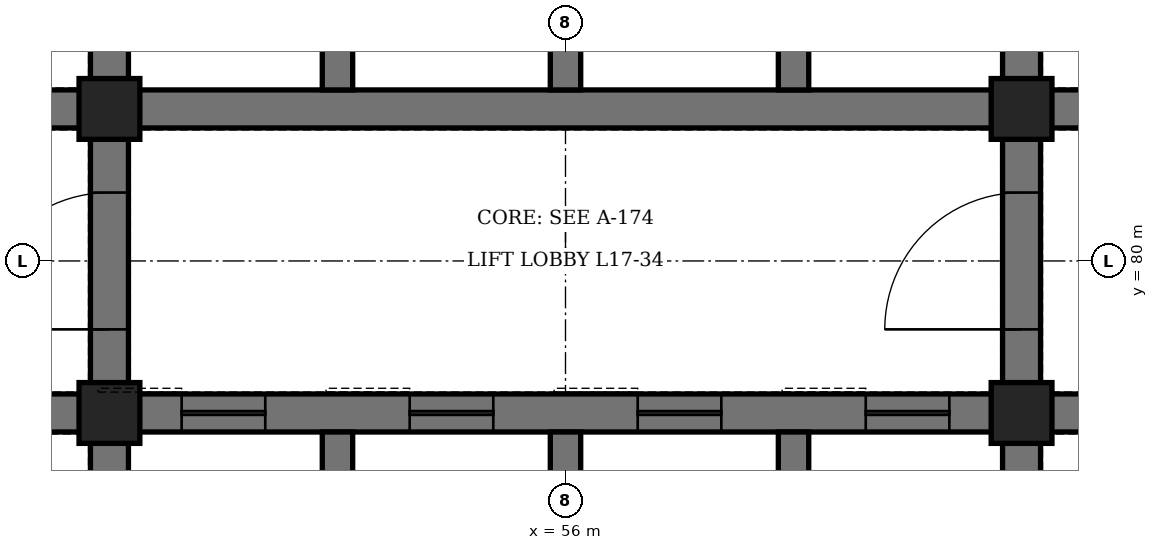
"""IFC4 building model, lengths in metres.
Left out: names, types, materials, properties, quantities, classifications, styles, units other than length and angle.
Written with IfcOpenShell. Run it as: python <this file> out.ifc"""

import sys

from ifc_helpers import new_model, si_unit, direction, frame, frame_2d, origin, origin_2d, place, context, subcontext, project, spatial, rectangle, hollow_rectangle, extrude, element, fill, save


model = new_model("IFC4")
c1 = context("Model", 3, precision=1e-05, world=origin(), true_north=direction((0.0, 1.0)))
c2 = subcontext(c1, "Body", "Model", "MODEL_VIEW")
j1 = project(units=[si_unit("LENGTHUNIT", "METRE"), si_unit("PLANEANGLEUNIT", "RADIAN")], contexts=[c1])
p1 = place(None, origin())
s1 = spatial("IfcSite", under=j1, at=p1, CompositionType="ELEMENT")
p2 = place(p1, origin())
s2 = spatial("IfcBuilding", under=s1, at=p2, CompositionType="ELEMENT")
p3 = place(p2, frame((0.0, 0.0, 81.1)))
s3 = spatial("IfcBuildingStorey", under=s2, at=p3, CompositionType="ELEMENT", Elevation=81.1)
p4 = place(p3, frame((50.0, 71.6, 0.0), z_axis=(0.0, 0.0, 1.0), x_axis=(0.0, 1.0, 0.0)))
e1 = element("IfcWall", 1, at=p4, inside=s3, PredefinedType="SHEAR", context=c2, shape_type="SweptSolid", body=[
    extrude(rectangle(XDim=16.8, YDim=0.5, at=frame_2d((8.4, 0.0))), origin(), (0.0, 0.0, 1.0), 4.2),
])
p5 = place(p4, frame((7.5, 0.0, 0.0)))
e2 = element("IfcOpeningElement", 2, at=p5, cuts=e1, PredefinedType="OPENING", context=c2, shape_type="SweptSolid", body=[
    extrude(rectangle(XDim=1.8, YDim=2.4, at=frame_2d((0.9, 1.2))), frame((0.0, 0.26, 0.0), z_axis=(0.0, -1.0, 0.0), x_axis=(1.0, 0.0, 0.0)), (0.0, 0.0, 1.0), 0.52),
])
p6 = place(p3, frame((62.0, 71.6, 0.0), z_axis=(0.0, 0.0, 1.0), x_axis=(0.0, 1.0, 0.0)))
e3 = element("IfcWall", 3, at=p6, inside=s3, PredefinedType="SHEAR", context=c2, shape_type="SweptSolid", body=[
    extrude(rectangle(XDim=16.8, YDim=0.5, at=frame_2d((8.4, 0.0))), origin(), (0.0, 0.0, 1.0), 4.2),
])
p7 = place(p6, frame((7.5, 0.0, 0.0)))
e4 = element("IfcOpeningElement", 4, at=p7, cuts=e3, PredefinedType="OPENING", context=c2, shape_type="SweptSolid", body=[
    extrude(rectangle(XDim=1.8, YDim=2.4, at=frame_2d((0.9, 1.2))), frame((0.0, 0.26, 0.0), z_axis=(0.0, -1.0, 0.0), x_axis=(1.0, 0.0, 0.0)), (0.0, 0.0, 1.0), 0.52),
])
p8 = place(p3, frame((44.6, 78.0, 0.0), z_axis=(0.0, 0.0, 1.0), x_axis=(1.0, 0.0, 0.0)))
e5 = element("IfcWall", 5, at=p8, inside=s3, PredefinedType="SHEAR", context=c2, shape_type="SweptSolid", body=[
    extrude(rectangle(XDim=5.15, YDim=0.5, at=frame_2d((2.575, 0.0))), origin(), (0.0, 0.0, 1.0), 4.2),
])
p9 = place(p8, frame((1.8, 0.0, 0.0)))
e6 = element("IfcOpeningElement", 6, at=p9, cuts=e5, PredefinedType="OPENING", context=c2, shape_type="SweptSolid", body=[
    extrude(rectangle(XDim=1.2, YDim=2.1, at=frame_2d((0.6, 1.05))), frame((0.0, 0.26, 0.0), z_axis=(0.0, -1.0, 0.0), x_axis=(1.0, 0.0, 0.0)), (0.0, 0.0, 1.0), 0.52),
])
p10 = place(p3, frame((44.6, 82.0, 0.0), z_axis=(0.0, 0.0, 1.0), x_axis=(1.0, 0.0, 0.0)))
e7 = element("IfcWall", 7, at=p10, inside=s3, PredefinedType="SHEAR", context=c2, shape_type="SweptSolid", body=[
    extrude(rectangle(XDim=5.15, YDim=0.5, at=frame_2d((2.575, 0.0))), origin(), (0.0, 0.0, 1.0), 4.2),
])
p11 = place(p10, frame((0.7, 0.0, 0.0)))
e8 = element("IfcOpeningElement", 8, at=p11, cuts=e7, PredefinedType="OPENING", context=c2, shape_type="SweptSolid", body=[
    extrude(rectangle(XDim=0.9, YDim=2.1, at=frame_2d((0.45, 1.05))), frame((0.0, 0.26, 0.0), z_axis=(0.0, -1.0, 0.0), x_axis=(1.0, 0.0, 0.0)), (0.0, 0.0, 1.0), 0.52),
])
p12 = place(p3, frame((62.25, 78.0, 0.0), z_axis=(0.0, 0.0, 1.0), x_axis=(1.0, 0.0, 0.0)))
e9 = element("IfcWall", 9, at=p12, inside=s3, PredefinedType="SHEAR", context=c2, shape_type="SweptSolid", body=[
    extrude(rectangle(XDim=5.15, YDim=0.5, at=frame_2d((2.575, 0.0))), origin(), (0.0, 0.0, 1.0), 4.2),
])
p13 = place(p12, frame((2.15, 0.0, 0.0)))
e10 = element("IfcOpeningElement", 10, at=p13, cuts=e9, PredefinedType="OPENING", context=c2, shape_type="SweptSolid", body=[
    extrude(rectangle(XDim=1.2, YDim=2.1, at=frame_2d((0.6, 1.05))), frame((0.0, 0.26, 0.0), z_axis=(0.0, -1.0, 0.0), x_axis=(1.0, 0.0, 0.0)), (0.0, 0.0, 1.0), 0.52),
])
p14 = place(p3, frame((62.25, 82.0, 0.0), z_axis=(0.0, 0.0, 1.0), x_axis=(1.0, 0.0, 0.0)))
e11 = element("IfcWall", 11, at=p14, inside=s3, PredefinedType="SHEAR", context=c2, shape_type="SweptSolid", body=[
    extrude(rectangle(XDim=5.15, YDim=0.5, at=frame_2d((2.575, 0.0))), origin(), (0.0, 0.0, 1.0), 4.2),
])
p15 = place(p14, frame((2.15, 0.0, 0.0)))
e12 = element("IfcOpeningElement", 12, at=p15, cuts=e11, PredefinedType="OPENING", context=c2, shape_type="SweptSolid", body=[
    extrude(rectangle(XDim=1.2, YDim=2.1, at=frame_2d((0.6, 1.05))), frame((0.0, 0.26, 0.0), z_axis=(0.0, -1.0, 0.0), x_axis=(1.0, 0.0, 0.0)), (0.0, 0.0, 1.0), 0.52),
])
p16 = place(p3, frame((50.25, 78.0, 0.0), z_axis=(0.0, 0.0, 1.0), x_axis=(1.0, 0.0, 0.0)))
e13 = element("IfcWall", 13, at=p16, inside=s3, PredefinedType="SHEAR", context=c2, shape_type="SweptSolid", body=[
    extrude(rectangle(XDim=11.5, YDim=0.5, at=frame_2d((5.75, 0.0))), origin(), (0.0, 0.0, 1.0), 4.2),
])
p17 = place(p16, frame((0.7, 0.0, 0.0)))
e14 = element("IfcOpeningElement", 14, at=p17, cuts=e13, PredefinedType="OPENING", context=c2, shape_type="SweptSolid", body=[
    extrude(rectangle(XDim=1.1, YDim=2.2, at=frame_2d((0.55, 1.1))), frame((0.0, 0.26, 0.0), z_axis=(0.0, -1.0, 0.0), x_axis=(1.0, 0.0, 0.0)), (0.0, 0.0, 1.0), 0.52),
])
p18 = place(p16, frame((3.7, 0.0, 0.0)))
e15 = element("IfcOpeningElement", 15, at=p18, cuts=e13, PredefinedType="OPENING", context=c2, shape_type="SweptSolid", body=[
    extrude(rectangle(XDim=1.1, YDim=2.2, at=frame_2d((0.55, 1.1))), frame((0.0, 0.26, 0.0), z_axis=(0.0, -1.0, 0.0), x_axis=(1.0, 0.0, 0.0)), (0.0, 0.0, 1.0), 0.52),
])
p19 = place(p16, frame((6.7, 0.0, 0.0)))
e16 = element("IfcOpeningElement", 16, at=p19, cuts=e13, PredefinedType="OPENING", context=c2, shape_type="SweptSolid", body=[
    extrude(rectangle(XDim=1.1, YDim=2.2, at=frame_2d((0.55, 1.1))), frame((0.0, 0.26, 0.0), z_axis=(0.0, -1.0, 0.0), x_axis=(1.0, 0.0, 0.0)), (0.0, 0.0, 1.0), 0.52),
])
p20 = place(p16, frame((9.7, 0.0, 0.0)))
e17 = element("IfcOpeningElement", 17, at=p20, cuts=e13, PredefinedType="OPENING", context=c2, shape_type="SweptSolid", body=[
    extrude(rectangle(XDim=1.1, YDim=2.2, at=frame_2d((0.55, 1.1))), frame((0.0, 0.26, 0.0), z_axis=(0.0, -1.0, 0.0), x_axis=(1.0, 0.0, 0.0)), (0.0, 0.0, 1.0), 0.52),
])
p21 = place(p3, frame((50.25, 82.0, 0.0), z_axis=(0.0, 0.0, 1.0), x_axis=(1.0, 0.0, 0.0)))
e18 = element("IfcWall", 18, at=p21, inside=s3, PredefinedType="SHEAR", context=c2, shape_type="SweptSolid", body=[
    extrude(rectangle(XDim=11.5, YDim=0.5, at=frame_2d((5.75, 0.0))), origin(), (0.0, 0.0, 1.0), 4.2),
])
p22 = place(p3, frame((53.0, 74.2, 0.0), z_axis=(0.0, 0.0, 1.0), x_axis=(0.0, 1.0, 0.0)))
e19 = element("IfcWall", 19, at=p22, inside=s3, PredefinedType="SHEAR", context=c2, shape_type="SweptSolid", body=[
    extrude(rectangle(XDim=3.55, YDim=0.4, at=frame_2d((1.775, 0.0))), origin(), (0.0, 0.0, 1.0), 4.2),
])
p23 = place(p3, frame((53.0, 82.25, 0.0), z_axis=(0.0, 0.0, 1.0), x_axis=(0.0, 1.0, 0.0)))
e20 = element("IfcWall", 20, at=p23, inside=s3, PredefinedType="SHEAR", context=c2, shape_type="SweptSolid", body=[
    extrude(rectangle(XDim=3.5, YDim=0.4, at=frame_2d((1.75, 0.0))), origin(), (0.0, 0.0, 1.0), 4.2),
])
p24 = place(p3, frame((56.0, 74.2, 0.0), z_axis=(0.0, 0.0, 1.0), x_axis=(0.0, 1.0, 0.0)))
e21 = element("IfcWall", 21, at=p24, inside=s3, PredefinedType="SHEAR", context=c2, shape_type="SweptSolid", body=[
    extrude(rectangle(XDim=3.55, YDim=0.4, at=frame_2d((1.775, 0.0))), origin(), (0.0, 0.0, 1.0), 4.2),
])
p25 = place(p3, frame((56.0, 82.25, 0.0), z_axis=(0.0, 0.0, 1.0), x_axis=(0.0, 1.0, 0.0)))
e22 = element("IfcWall", 22, at=p25, inside=s3, PredefinedType="SHEAR", context=c2, shape_type="SweptSolid", body=[
    extrude(rectangle(XDim=3.5, YDim=0.4, at=frame_2d((1.75, 0.0))), origin(), (0.0, 0.0, 1.0), 4.2),
])
p26 = place(p3, frame((59.0, 74.2, 0.0), z_axis=(0.0, 0.0, 1.0), x_axis=(0.0, 1.0, 0.0)))
e23 = element("IfcWall", 23, at=p26, inside=s3, PredefinedType="SHEAR", context=c2, shape_type="SweptSolid", body=[
    extrude(rectangle(XDim=3.55, YDim=0.4, at=frame_2d((1.775, 0.0))), origin(), (0.0, 0.0, 1.0), 4.2),
])
p27 = place(p3, frame((59.0, 82.25, 0.0), z_axis=(0.0, 0.0, 1.0), x_axis=(0.0, 1.0, 0.0)))
e24 = element("IfcWall", 24, at=p27, inside=s3, PredefinedType="SHEAR", context=c2, shape_type="SweptSolid", body=[
    extrude(rectangle(XDim=3.5, YDim=0.4, at=frame_2d((1.75, 0.0))), origin(), (0.0, 0.0, 1.0), 4.2),
])
for number, where, z_axis, x_axis in (
    (25, (50.0, 78.0, 0.0), (0.0, 0.0, 1.0), (1.0, 0.0, 0.0)),
    (26, (50.0, 82.0, 0.0), (0.0, 0.0, 1.0), (1.0, 0.0, 0.0)),
    (27, (62.0, 78.0, 0.0), (0.0, 0.0, 1.0), (1.0, 0.0, 0.0)),
    (28, (62.0, 82.0, 0.0), (0.0, 0.0, 1.0), (1.0, 0.0, 0.0)),
):
    element("IfcColumn", number, at=place(p3, frame(where, z_axis=z_axis, x_axis=x_axis)), inside=s3, PredefinedType="COLUMN", context=c2, shape_type="SweptSolid", body=[
        extrude(hollow_rectangle(XDim=0.8, YDim=0.8, WallThickness=0.1, at=origin_2d()), origin(), (0.0, 0.0, 1.0), 4.2),
    ])
p28 = place(p5, origin())
e29 = element("IfcDoor", 29, at=p28, inside=s3, OperationType="DOUBLE_DOOR_SINGLE_SWING", PredefinedType="DOOR", context=c2, shape_type="SweptSolid", body=[
    extrude(rectangle(XDim=1.8, YDim=2.4, at=frame_2d((0.9, 1.2))), frame((0.0, 0.25, 0.0), z_axis=(0.0, -1.0, 0.0), x_axis=(1.0, 0.0, 0.0)), (0.0, 0.0, 1.0), 0.5),
])
fill(e2, e29)
p29 = place(p7, origin())
e30 = element("IfcDoor", 30, at=p29, inside=s3, OperationType="DOUBLE_DOOR_SINGLE_SWING", PredefinedType="DOOR", context=c2, shape_type="SweptSolid", body=[
    extrude(rectangle(XDim=1.8, YDim=2.4, at=frame_2d((0.9, 1.2))), frame((0.0, 0.25, 0.0), z_axis=(0.0, -1.0, 0.0), x_axis=(1.0, 0.0, 0.0)), (0.0, 0.0, 1.0), 0.5),
])
fill(e4, e30)
p30 = place(p17, origin())
e31 = element("IfcDoor", 31, at=p30, inside=s3, OperationType="SLIDING_TO_LEFT", PredefinedType="DOOR", context=c2, shape_type="SweptSolid", body=[
    extrude(rectangle(XDim=1.1, YDim=2.2, at=frame_2d((0.55, 1.1))), frame((0.0, 0.25, 0.0), z_axis=(0.0, -1.0, 0.0), x_axis=(1.0, 0.0, 0.0)), (0.0, 0.0, 1.0), 0.5),
])
fill(e14, e31)
p31 = place(p18, origin())
e32 = element("IfcDoor", 32, at=p31, inside=s3, OperationType="SLIDING_TO_LEFT", PredefinedType="DOOR", context=c2, shape_type="SweptSolid", body=[
    extrude(rectangle(XDim=1.1, YDim=2.2, at=frame_2d((0.55, 1.1))), frame((0.0, 0.25, 0.0), z_axis=(0.0, -1.0, 0.0), x_axis=(1.0, 0.0, 0.0)), (0.0, 0.0, 1.0), 0.5),
])
fill(e15, e32)
p32 = place(p19, origin())
e33 = element("IfcDoor", 33, at=p32, inside=s3, OperationType="SLIDING_TO_LEFT", PredefinedType="DOOR", context=c2, shape_type="SweptSolid", body=[
    extrude(rectangle(XDim=1.1, YDim=2.2, at=frame_2d((0.55, 1.1))), frame((0.0, 0.25, 0.0), z_axis=(0.0, -1.0, 0.0), x_axis=(1.0, 0.0, 0.0)), (0.0, 0.0, 1.0), 0.5),
])
fill(e16, e33)
p33 = place(p20, origin())
e34 = element("IfcDoor", 34, at=p33, inside=s3, OperationType="SLIDING_TO_LEFT", PredefinedType="DOOR", context=c2, shape_type="SweptSolid", body=[
    extrude(rectangle(XDim=1.1, YDim=2.2, at=frame_2d((0.55, 1.1))), frame((0.0, 0.25, 0.0), z_axis=(0.0, -1.0, 0.0), x_axis=(1.0, 0.0, 0.0)), (0.0, 0.0, 1.0), 0.5),
])
fill(e17, e34)
save(model, sys.argv[1])
